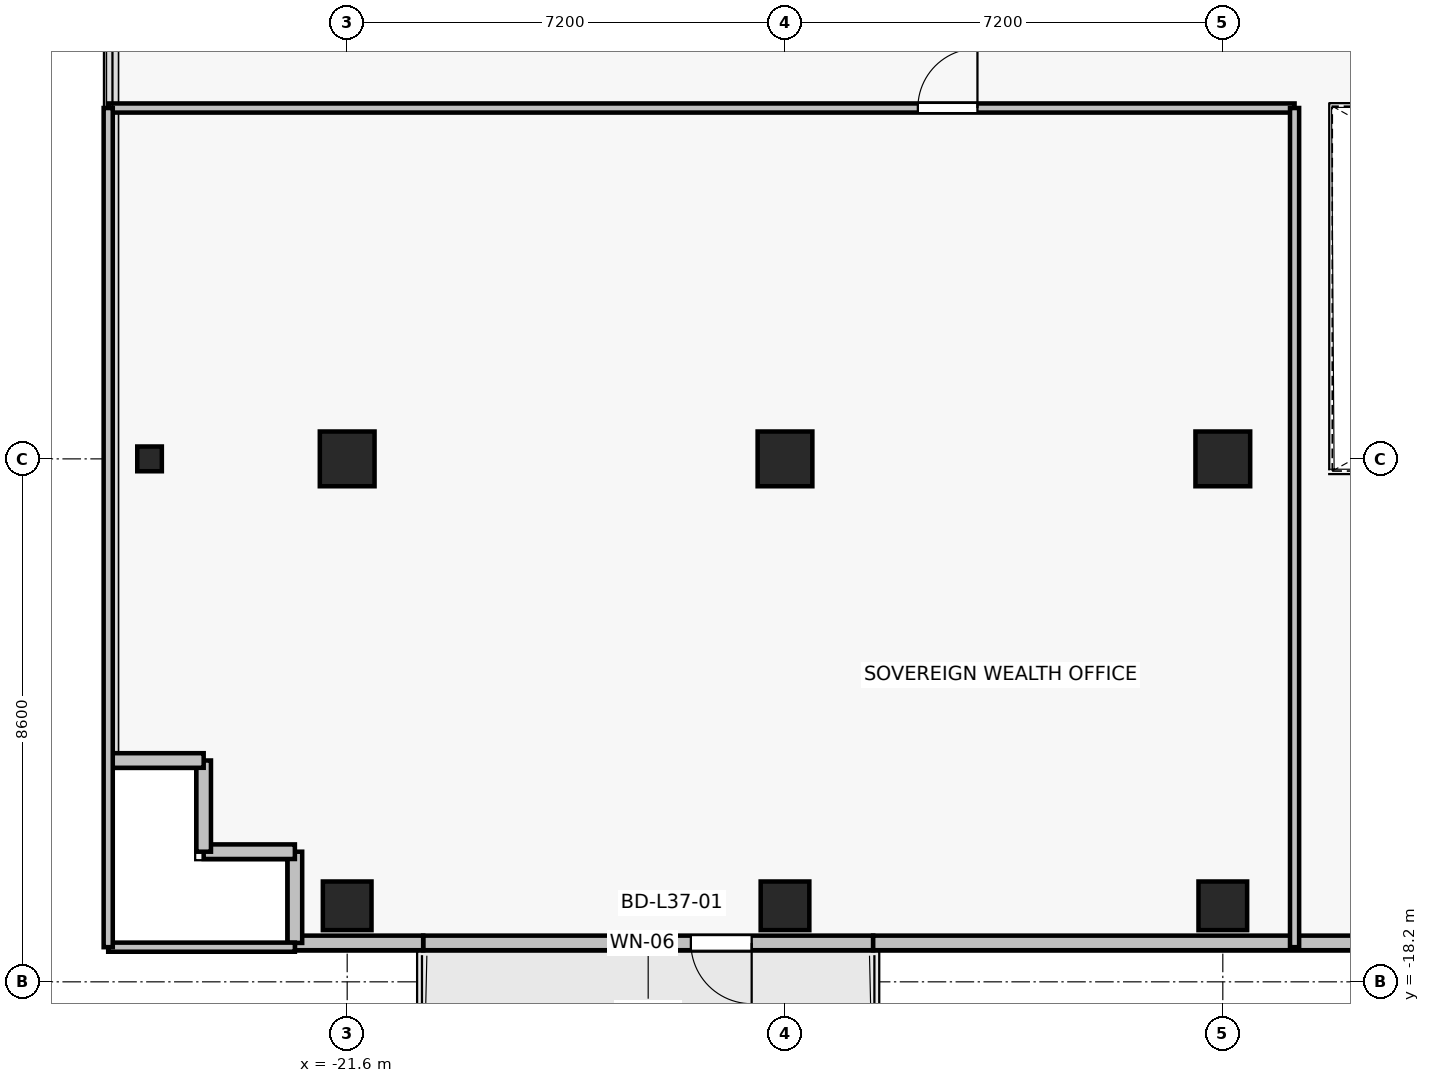
"""IFC4 building model, lengths in metres.
Left out: names, types, materials, properties, quantities, classifications, styles, units other than length and angle.
Written with IfcOpenShell. Run it as: python <this file> out.ifc"""

import sys

from ifc_helpers import new_model, si_unit, direction, frame, frame_2d, origin, origin_2d, place, context, subcontext, project, spatial, rectangle, i_section, extrude, source, transform, mapped, element, fill, save


model = new_model("IFC4")
c1 = context("Model", 3, precision=1e-05, world=origin(), true_north=direction((0.0, 1.0)))
c2 = subcontext(c1, "Body", "Model", "MODEL_VIEW")
j1 = project(units=[si_unit("LENGTHUNIT", "METRE"), si_unit("PLANEANGLEUNIT", "RADIAN")], contexts=[c1])
p1 = place(None, origin())
s1 = spatial("IfcSite", under=j1, at=p1, CompositionType="ELEMENT")
p2 = place(p1, origin())
s2 = spatial("IfcBuilding", under=s1, at=p2, CompositionType="ELEMENT")
p3 = place(p2, frame((0.0, 0.0, 133.0)))
s3 = spatial("IfcBuildingStorey", under=s2, at=p3, CompositionType="ELEMENT", Elevation=133.0)
for number, where, z_axis, x_axis in (
    (1, (-14.4, -9.6, 0.0), (0.0, 0.0, 1.0), (1.0, 0.0, 0.0)),
    (2, (-7.2, -9.6, 0.0), (0.0, 0.0, 1.0), (1.0, 0.0, 0.0)),
    (3, (-21.6, -9.6, 0.0), (0.0, 0.0, 1.0), (1.0, 0.0, 0.0)),
):
    element("IfcColumn", number, at=place(p3, frame(where, z_axis=z_axis, x_axis=x_axis)), inside=s3, PredefinedType="COLUMN", context=c2, shape_type="SweptSolid", body=[
        extrude(rectangle(XDim=0.9, YDim=0.9, at=origin_2d()), origin(), (0.0, 0.0, 1.0), 3.3),
    ])
for number, where, z_axis, x_axis in (
    (4, (-14.4, -16.95, 0.0), (0.0, 0.0, 1.0), (1.0, 0.0, 0.0)),
    (5, (-7.2, -16.95, 0.0), (0.0, 0.0, 1.0), (1.0, 0.0, 0.0)),
    (6, (-21.6, -16.95, 0.0), (0.0, 0.0, 1.0), (1.0, 0.0, 0.0)),
):
    element("IfcColumn", number, at=place(p3, frame(where, z_axis=z_axis, x_axis=x_axis)), inside=s3, PredefinedType="COLUMN", context=c2, shape_type="SweptSolid", body=[
        extrude(rectangle(XDim=0.8, YDim=0.8, at=origin_2d()), origin(), (0.0, 0.0, 1.0), 3.3),
    ])
p4 = place(p3, frame((-24.85, -9.6, 0.0), z_axis=(0.0, 0.0, 1.0), x_axis=(1.0, 0.0, 0.0)))
e7 = element("IfcColumn", 7, at=p4, inside=s3, PredefinedType="COLUMN", context=c2, shape_type="SweptSolid", body=[
    extrude(i_section(OverallWidth=0.404, OverallDepth=0.407, WebThickness=0.022, FlangeThickness=0.032, FilletRadius=0.015, at=origin_2d()), origin(), (0.0, 0.0, 1.0), 3.3),
])
p5 = place(p3, frame((-12.95, -17.56, 0.0), z_axis=(0.0, 0.0, 1.0), x_axis=(-1.0, 0.0, 0.0)))
e8 = element("IfcWall", 8, at=p5, inside=s3, PredefinedType="SOLIDWALL", context=c2, shape_type="SweptSolid", body=[
    extrude(rectangle(XDim=7.4, YDim=0.24, at=frame_2d((3.7, 0.0))), origin(), (0.0, 0.0, 1.0), 2.665),
])
p6 = place(p5, frame((1.998, 0.0, 0.0)))
e9 = element("IfcOpeningElement", 9, at=p6, cuts=e8, PredefinedType="OPENING", context=c2, shape_type="SweptSolid", body=[
    extrude(rectangle(XDim=1.0, YDim=2.2, at=frame_2d((0.5, 1.1))), frame((0.0, 0.13, 0.0), z_axis=(0.0, -1.0, 0.0), x_axis=(1.0, 0.0, 0.0)), (0.0, 0.0, 1.0), 0.26),
])
p7 = place(p5, frame((3.348, 0.0, 0.85)))
e10 = element("IfcOpeningElement", 10, at=p7, cuts=e8, PredefinedType="OPENING", context=c2, shape_type="SweptSolid", body=[
    extrude(rectangle(XDim=0.9, YDim=1.35, at=frame_2d((0.45, 0.675))), frame((0.0, 0.13, 0.0), z_axis=(0.0, -1.0, 0.0), x_axis=(1.0, 0.0, 0.0)), (0.0, 0.0, 1.0), 0.26),
])
p8 = place(p3, frame((-12.95, -17.56, 0.0), z_axis=(0.0, 0.0, 1.0), x_axis=(1.0, 0.0, 0.0)))
e11 = element("IfcWall", 11, at=p8, inside=s3, PredefinedType="SOLIDWALL", context=c2, shape_type="SweptSolid", body=[
    extrude(rectangle(XDim=9.61, YDim=0.24, at=frame_2d((4.805, 0.0))), origin(), (0.0, 0.0, 1.0), 2.665),
])
p9 = place(p3, frame((-22.46, -17.56, 0.0), z_axis=(0.0, 0.0, 1.0), x_axis=(1.0, 0.0, 0.0)))
e12 = element("IfcWall", 12, at=p9, inside=s3, PredefinedType="SOLIDWALL", context=c2, shape_type="SweptSolid", body=[
    extrude(rectangle(XDim=2.11, YDim=0.24, at=frame_2d((1.055, 0.0))), origin(), (0.0, 0.0, 1.0), 3.075),
])
p10 = place(p3, frame((-22.46, -16.06, 0.0), z_axis=(0.0, 0.0, 1.0), x_axis=(0.0, -1.0, 0.0)))
e13 = element("IfcWall", 13, at=p10, inside=s3, PredefinedType="SOLIDWALL", context=c2, shape_type="SweptSolid", body=[
    extrude(rectangle(XDim=1.5, YDim=0.24, at=frame_2d((0.75, 0.0))), origin(), (0.0, 0.0, 1.0), 2.565),
])
for number, where, z_axis, x_axis in (
    (14, (-23.96, -16.06, 0.0), (0.0, 0.0, 1.0), (1.0, 0.0, 0.0)),
    (15, (-23.96, -14.56, 0.0), (0.0, 0.0, 1.0), (0.0, -1.0, 0.0)),
    (16, (-25.46, -14.56, 0.0), (0.0, 0.0, 1.0), (1.0, 0.0, 0.0)),
):
    element("IfcWall", number, at=place(p3, frame(where, z_axis=z_axis, x_axis=x_axis)), inside=s3, PredefinedType="SOLIDWALL", context=c2, shape_type="SweptSolid", body=[
        extrude(rectangle(XDim=1.5, YDim=0.24, at=frame_2d((0.75, 0.0))), origin(), (0.0, 0.0, 1.0), 3.075),
    ])
p11 = place(p3, frame((-22.46, -17.63, 0.0), z_axis=(0.0, 0.0, 1.0), x_axis=(-1.0, 0.0, 0.0)))
e17 = element("IfcWall", 17, at=p11, inside=s3, PredefinedType="PARTITIONING", context=c2, shape_type="SweptSolid", body=[
    extrude(rectangle(XDim=3.07, YDim=0.15, at=frame_2d((1.535, 0.0))), origin(), (0.0, 0.0, 1.0), 2.665),
])
p12 = place(p3, frame((-25.53, -3.83, 0.0), z_axis=(0.0, 0.0, 1.0), x_axis=(1.0, 0.0, 0.0)))
e18 = element("IfcWall", 18, at=p12, inside=s3, PredefinedType="PARTITIONING", context=c2, shape_type="SweptSolid", body=[
    extrude(rectangle(XDim=19.51, YDim=0.15, at=frame_2d((9.755, 0.0))), origin(), (0.0, 0.0, 1.0), 2.515),
])
p13 = place(p12, frame((13.315, 0.0, 0.0)))
e19 = element("IfcOpeningElement", 19, at=p13, cuts=e18, PredefinedType="OPENING", context=c2, shape_type="SweptSolid", body=[
    extrude(rectangle(XDim=0.98, YDim=2.15, at=frame_2d((0.49, 1.075))), frame((0.0, 0.085, 0.0), z_axis=(0.0, -1.0, 0.0), x_axis=(1.0, 0.0, 0.0)), (0.0, 0.0, 1.0), 0.17),
])
p14 = place(p3, frame((-25.53, -17.63, 0.0), z_axis=(0.0, 0.0, 1.0), x_axis=(0.0, 1.0, 0.0)))
e20 = element("IfcWall", 20, at=p14, inside=s3, PredefinedType="PARTITIONING", context=c2, shape_type="SweptSolid", body=[
    extrude(rectangle(XDim=13.8, YDim=0.15, at=frame_2d((6.9, 0.0))), origin(), (0.0, 0.0, 1.0), 2.665),
])
p15 = place(p3, frame((-6.02, -3.83, 0.0), z_axis=(0.0, 0.0, 1.0), x_axis=(0.0, -1.0, 0.0)))
e21 = element("IfcWall", 21, at=p15, inside=s3, PredefinedType="PARTITIONING", context=c2, shape_type="SweptSolid", body=[
    extrude(rectangle(XDim=13.8, YDim=0.15, at=frame_2d((6.9, 0.0))), origin(), (0.0, 0.0, 1.0), 2.515),
])
m1 = source(origin(), c2, "Body", "SweptSolid", [
    extrude(rectangle(XDim=1.0, YDim=2.2, at=frame_2d((0.5, 1.1))), frame((0.0, 0.025, 0.0), z_axis=(0.0, -1.0, 0.0), x_axis=(1.0, 0.0, 0.0)), (0.0, 0.0, 1.0), 0.05),
])
p16 = place(p6, origin())
e22 = element("IfcDoor", 22, at=p16, inside=s3, OperationType="SINGLE_SWING_LEFT", PredefinedType="DOOR", context=c2, shape_type="MappedRepresentation", body=[
    mapped(m1, transform((0.0, 0.0, 0.0), x_axis=(1.0, 0.0, 0.0), y_axis=(0.0, 1.0, 0.0), z_axis=(0.0, 0.0, 1.0), scale=1.0)),
])
fill(e9, e22)
m2 = source(origin(), c2, "Body", "SweptSolid", [
    extrude(rectangle(XDim=0.9, YDim=1.35, at=frame_2d((0.45, 0.675))), frame((0.0, 0.03, 0.0), z_axis=(0.0, -1.0, 0.0), x_axis=(1.0, 0.0, 0.0)), (0.0, 0.0, 1.0), 0.06),
])
p17 = place(p7, origin())
e23 = element("IfcWindow", 23, at=p17, inside=s3, PartitioningType="SINGLE_PANEL", PredefinedType="WINDOW", context=c2, shape_type="MappedRepresentation", body=[
    mapped(m2, transform((0.0, 0.0, 0.0), x_axis=(1.0, 0.0, 0.0), y_axis=(0.0, 1.0, 0.0), z_axis=(0.0, 0.0, 1.0), scale=1.0)),
])
fill(e10, e23)
m3 = source(origin(), c2, "Body", "SweptSolid", [
    extrude(rectangle(XDim=0.98, YDim=2.15, at=frame_2d((0.49, 1.075))), frame((0.0, 0.025, 0.0), z_axis=(0.0, -1.0, 0.0), x_axis=(1.0, 0.0, 0.0)), (0.0, 0.0, 1.0), 0.05),
])
p18 = place(p13, origin())
e24 = element("IfcDoor", 24, at=p18, inside=s3, OperationType="SINGLE_SWING_RIGHT", PredefinedType="DOOR", context=c2, shape_type="MappedRepresentation", body=[
    mapped(m3, transform((0.0, 0.0, 0.0), x_axis=(1.0, 0.0, 0.0), y_axis=(0.0, 1.0, 0.0), z_axis=(0.0, 0.0, 1.0), scale=1.0)),
])
fill(e19, e24)
save(model, sys.argv[1])
